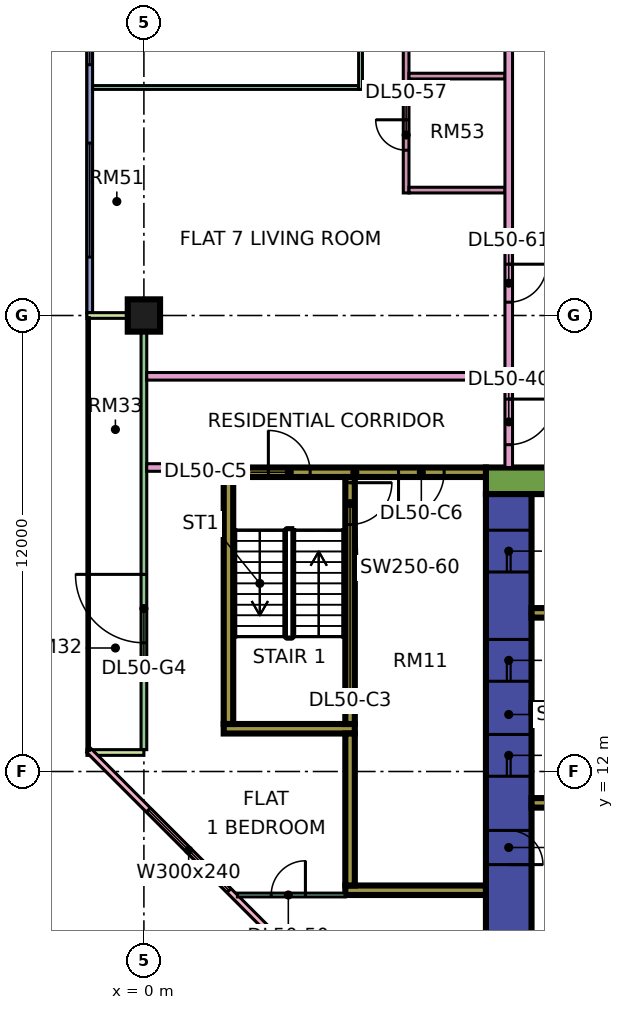
"""IFC4 building model, lengths in metres.
Left out: names, types, materials, properties, quantities, classifications, styles, units other than length and angle.
Written with IfcOpenShell. Run it as: python <this file> out.ifc"""

import sys

from ifc_helpers import new_model, si_unit, direction, frame, frame_2d, origin, origin_2d, place, context, subcontext, project, spatial, rectangle, extrude, element, fill, save


model = new_model("IFC4")
c1 = context("Model", 3, precision=1e-05, world=origin(), true_north=direction((0.0, 1.0)))
c2 = subcontext(c1, "Body", "Model", "MODEL_VIEW")
j1 = project(units=[si_unit("LENGTHUNIT", "METRE"), si_unit("PLANEANGLEUNIT", "RADIAN")], contexts=[c1])
p1 = place(None, origin())
s1 = spatial("IfcSite", under=j1, at=p1, CompositionType="ELEMENT")
p2 = place(p1, origin())
s2 = spatial("IfcBuilding", under=s1, at=p2, CompositionType="ELEMENT")
p3 = place(p2, frame((0.0, 0.0, 215.4)))
s3 = spatial("IfcBuildingStorey", under=s2, at=p3, CompositionType="ELEMENT", Elevation=215.4)
p4 = place(p3, frame((0.0, 24.0, 0.0), z_axis=(0.0, 0.0, 1.0), x_axis=(1.0, 0.0, 0.0)))
e1 = element("IfcColumn", 1, at=p4, inside=s3, PredefinedType="COLUMN", context=c2, shape_type="SweptSolid", body=[
    extrude(rectangle(XDim=0.85, YDim=0.85, at=origin_2d()), origin(), (0.0, 0.0, 1.0), 3.75),
])
p5 = place(p3, frame((9.0, 19.65, 0.0), z_axis=(0.0, 0.0, 1.0), x_axis=(1.0, 0.0, 0.0)))
e2 = element("IfcWall", 2, at=p5, inside=s3, PredefinedType="SHEAR", context=c2, shape_type="SweptSolid", body=[
    extrude(rectangle(XDim=25.0, YDim=0.7, at=frame_2d((12.5, 0.0))), origin(), (0.0, 0.0, 1.0), 3.75),
])
p6 = place(p5, frame((19.1, 0.0, 0.0)))
e3 = element("IfcOpeningElement", 3, at=p6, cuts=e2, PredefinedType="OPENING", context=c2, shape_type="SweptSolid", body=[
    extrude(rectangle(XDim=1.8, YDim=2.4, at=frame_2d((0.9, 1.2))), frame((0.0, 0.36, 0.0), z_axis=(0.0, -1.0, 0.0), x_axis=(1.0, 0.0, 0.0)), (0.0, 0.0, 1.0), 0.72),
])
p7 = place(p3, frame((9.6, 7.7, 0.0), z_axis=(0.0, 0.0, 1.0), x_axis=(0.0, 1.0, 0.0)))
e4 = element("IfcWall", 4, at=p7, inside=s3, PredefinedType="SHEAR", context=c2, shape_type="SweptSolid", body=[
    extrude(rectangle(XDim=11.6, YDim=1.2, at=frame_2d((5.8, 0.0))), origin(), (0.0, 0.0, 1.0), 3.75),
])
p8 = place(p7, frame((4.175, 0.0, 0.0)))
e5 = element("IfcOpeningElement", 5, at=p8, cuts=e4, PredefinedType="OPENING", context=c2, shape_type="SweptSolid", body=[
    extrude(rectangle(XDim=1.1, YDim=2.2, at=frame_2d((0.55, 1.1))), frame((0.0, 0.61, 0.0), z_axis=(0.0, -1.0, 0.0), x_axis=(1.0, 0.0, 0.0)), (0.0, 0.0, 1.0), 1.22),
])
p9 = place(p7, frame((6.675, 0.0, 0.0)))
e6 = element("IfcOpeningElement", 6, at=p9, cuts=e4, PredefinedType="OPENING", context=c2, shape_type="SweptSolid", body=[
    extrude(rectangle(XDim=1.1, YDim=2.2, at=frame_2d((0.55, 1.1))), frame((0.0, 0.61, 0.0), z_axis=(0.0, -1.0, 0.0), x_axis=(1.0, 0.0, 0.0)), (0.0, 0.0, 1.0), 1.22),
])
p10 = place(p7, frame((9.55, 0.0, 0.0)))
e7 = element("IfcOpeningElement", 7, at=p10, cuts=e4, PredefinedType="OPENING", context=c2, shape_type="SweptSolid", body=[
    extrude(rectangle(XDim=1.1, YDim=2.2, at=frame_2d((0.55, 1.1))), frame((0.0, 0.61, 0.0), z_axis=(0.0, -1.0, 0.0), x_axis=(1.0, 0.0, 0.0)), (0.0, 0.0, 1.0), 1.22),
])
p11 = place(p7, frame((1.85, 0.0, 0.0)))
e8 = element("IfcOpeningElement", 8, at=p11, cuts=e4, PredefinedType="OPENING", context=c2, shape_type="SweptSolid", body=[
    extrude(rectangle(XDim=0.9, YDim=2.1, at=frame_2d((0.45, 1.05))), frame((0.0, 0.61, 0.0), z_axis=(0.0, -1.0, 0.0), x_axis=(1.0, 0.0, 0.0)), (0.0, 0.0, 1.0), 1.22),
])
for number, where, z_axis, x_axis in (
    (9, (10.2, 11.175, 0.0), (0.0, 0.0, 1.0), (1.0, 0.0, 0.0)),
    (10, (10.2, 13.675, 0.0), (0.0, 0.0, 1.0), (1.0, 0.0, 0.0)),
    (11, (10.2, 16.175, 0.0), (0.0, 0.0, 1.0), (1.0, 0.0, 0.0)),
):
    element("IfcWall", number, at=place(p3, frame(where, z_axis=z_axis, x_axis=x_axis)), inside=s3, PredefinedType="SHEAR", context=c2, shape_type="SweptSolid", body=[
        extrude(rectangle(XDim=3.0, YDim=0.25, at=frame_2d((1.5, 0.0))), origin(), (0.0, 0.0, 1.0), 3.75),
    ])
p12 = place(p3, frame((2.1, 19.875, 0.0), z_axis=(0.0, 0.0, 1.0), x_axis=(1.0, 0.0, 0.0)))
e12 = element("IfcWall", 12, at=p12, inside=s3, PredefinedType="SHEAR", context=c2, shape_type="SweptSolid", body=[
    extrude(rectangle(XDim=6.9, YDim=0.25, at=frame_2d((3.45, 0.0))), origin(), (0.0, 0.0, 1.0), 3.75),
])
p13 = place(p12, frame((1.175, 0.0, 0.0)))
e13 = element("IfcOpeningElement", 13, at=p13, cuts=e12, PredefinedType="OPENING", context=c2, shape_type="SweptSolid", body=[
    extrude(rectangle(XDim=1.1, YDim=2.2, at=frame_2d((0.55, 1.1))), frame((0.0, 0.135, 0.0), z_axis=(0.0, -1.0, 0.0), x_axis=(1.0, 0.0, 0.0)), (0.0, 0.0, 1.0), 0.27),
])
p14 = place(p12, frame((4.6, 0.0, 0.0)))
e14 = element("IfcOpeningElement", 14, at=p14, cuts=e12, PredefinedType="OPENING", context=c2, shape_type="SweptSolid", body=[
    extrude(rectangle(XDim=1.2, YDim=2.2, at=frame_2d((0.6, 1.1))), frame((0.0, 0.135, 0.0), z_axis=(0.0, -1.0, 0.0), x_axis=(1.0, 0.0, 0.0)), (0.0, 0.0, 1.0), 0.27),
])
p15 = place(p3, frame((2.1, 13.125, 0.0), z_axis=(0.0, 0.0, 1.0), x_axis=(1.0, 0.0, 0.0)))
e15 = element("IfcWall", 15, at=p15, inside=s3, PredefinedType="SHEAR", context=c2, shape_type="SweptSolid", body=[
    extrude(rectangle(XDim=3.45, YDim=0.25, at=frame_2d((1.725, 0.0))), origin(), (0.0, 0.0, 1.0), 3.75),
])
p16 = place(p3, frame((2.225, 13.25, 0.0), z_axis=(0.0, 0.0, 1.0), x_axis=(0.0, 1.0, 0.0)))
e16 = element("IfcWall", 16, at=p16, inside=s3, PredefinedType="SHEAR", context=c2, shape_type="SweptSolid", body=[
    extrude(rectangle(XDim=6.5, YDim=0.25, at=frame_2d((3.25, 0.0))), origin(), (0.0, 0.0, 1.0), 3.75),
])
p17 = place(p3, frame((5.425, 13.25, 0.0), z_axis=(0.0, 0.0, 1.0), x_axis=(0.0, 1.0, 0.0)))
e17 = element("IfcWall", 17, at=p17, inside=s3, PredefinedType="SHEAR", context=c2, shape_type="SweptSolid", body=[
    extrude(rectangle(XDim=6.5, YDim=0.25, at=frame_2d((3.25, 0.0))), origin(), (0.0, 0.0, 1.0), 3.75),
])
p18 = place(p17, frame((5.25, 0.0, 0.0)))
e18 = element("IfcOpeningElement", 18, at=p18, cuts=e17, PredefinedType="OPENING", context=c2, shape_type="SweptSolid", body=[
    extrude(rectangle(XDim=1.1, YDim=2.2, at=frame_2d((0.55, 1.1))), frame((0.0, 0.135, 0.0), z_axis=(0.0, -1.0, 0.0), x_axis=(1.0, 0.0, 0.0)), (0.0, 0.0, 1.0), 0.27),
])
p19 = place(p3, frame((5.3, 8.875, 0.0), z_axis=(0.0, 0.0, 1.0), x_axis=(1.0, 0.0, 0.0)))
e19 = element("IfcWall", 19, at=p19, inside=s3, PredefinedType="SHEAR", context=c2, shape_type="SweptSolid", body=[
    extrude(rectangle(XDim=3.7, YDim=0.25, at=frame_2d((1.85, 0.0))), origin(), (0.0, 0.0, 1.0), 3.75),
])
p20 = place(p3, frame((5.425, 9.0, 0.0), z_axis=(0.0, 0.0, 1.0), x_axis=(0.0, 1.0, 0.0)))
e20 = element("IfcWall", 20, at=p20, inside=s3, PredefinedType="SHEAR", context=c2, shape_type="SweptSolid", body=[
    extrude(rectangle(XDim=4.0, YDim=0.25, at=frame_2d((2.0, 0.0))), origin(), (0.0, 0.0, 1.0), 3.75),
])
p21 = place(p3, frame((-1.425, 35.925, 0.0), z_axis=(0.0, 0.0, 1.0), x_axis=(0.0, -1.0, 0.0)))
e21 = element("IfcWall", 21, at=p21, inside=s3, PredefinedType="SOLIDWALL", context=c2, shape_type="SweptSolid", body=[
    extrude(rectangle(XDim=11.85, YDim=0.15, at=frame_2d((5.925, 0.0))), origin(), (0.0, 0.0, 1.0), 3.35),
])
p22 = place(p21, frame((0.562, 0.0, 0.45)))
e22 = element("IfcOpeningElement", 22, at=p22, cuts=e21, PredefinedType="OPENING", context=c2, shape_type="SweptSolid", body=[
    extrude(rectangle(XDim=1.8, YDim=2.4, at=frame_2d((0.9, 1.2))), frame((0.0, 0.085, 0.0), z_axis=(0.0, -1.0, 0.0), x_axis=(1.0, 0.0, 0.0)), (0.0, 0.0, 1.0), 0.17),
])
p23 = place(p21, frame((3.525, 0.0, 0.45)))
e23 = element("IfcOpeningElement", 23, at=p23, cuts=e21, PredefinedType="OPENING", context=c2, shape_type="SweptSolid", body=[
    extrude(rectangle(XDim=1.8, YDim=2.4, at=frame_2d((0.9, 1.2))), frame((0.0, 0.085, 0.0), z_axis=(0.0, -1.0, 0.0), x_axis=(1.0, 0.0, 0.0)), (0.0, 0.0, 1.0), 0.17),
])
p24 = place(p21, frame((7.387, 0.0, 0.45)))
e24 = element("IfcOpeningElement", 24, at=p24, cuts=e21, PredefinedType="OPENING", context=c2, shape_type="SweptSolid", body=[
    extrude(rectangle(XDim=3.0, YDim=2.4, at=frame_2d((1.5, 1.2))), frame((0.0, 0.085, 0.0), z_axis=(0.0, -1.0, 0.0), x_axis=(1.0, 0.0, 0.0)), (0.0, 0.0, 1.0), 0.17),
])
p25 = place(p3, frame((0.0, 23.925, 0.0), z_axis=(0.0, 0.0, 1.0), x_axis=(0.0, -1.0, 0.0)))
e25 = element("IfcWall", 25, at=p25, inside=s3, PredefinedType="SOLIDWALL", context=c2, shape_type="SweptSolid", body=[
    extrude(rectangle(XDim=11.35, YDim=0.15, at=frame_2d((5.675, 0.0))), origin(), (0.0, 0.0, 1.0), 3.35),
])
p26 = place(p25, frame((6.738, 0.0, 0.0)))
e26 = element("IfcOpeningElement", 26, at=p26, cuts=e25, PredefinedType="OPENING", context=c2, shape_type="SweptSolid", body=[
    extrude(rectangle(XDim=1.8, YDim=2.4, at=frame_2d((0.9, 1.2))), frame((0.0, 0.085, 0.0), z_axis=(0.0, -1.0, 0.0), x_axis=(1.0, 0.0, 0.0)), (0.0, 0.0, 1.0), 0.17),
])
for number, where, z_axis, x_axis in (
    (27, (-1.5, 24.0, 0.0), (0.0, 0.0, 1.0), (1.0, 0.0, 0.0)),
    (28, (-1.5, 12.5, 0.0), (0.0, 0.0, 1.0), (1.0, 0.0, 0.0)),
):
    element("IfcWall", number, at=place(p3, frame(where, z_axis=z_axis, x_axis=x_axis)), inside=s3, PredefinedType="SOLIDWALL", context=c2, shape_type="SweptSolid", body=[
        extrude(rectangle(XDim=1.5, YDim=0.15, at=frame_2d((0.75, 0.0))), origin(), (0.0, 0.0, 1.0), 3.35),
    ])
p27 = place(p3, frame((-1.447, 12.553, 0.0), z_axis=(0.0, 0.0, 1.0), x_axis=(0.707106781187, -0.707106781187, 0.0)))
e29 = element("IfcWall", 29, at=p27, inside=s3, PredefinedType="SOLIDWALL", context=c2, shape_type="SweptSolid", body=[
    extrude(rectangle(XDim=19.799, YDim=0.15, at=frame_2d((9.899, 0.0))), origin(), (0.0, 0.0, 1.0), 3.35),
])
p28 = place(p27, frame((2.212, 0.0, 0.45)))
e30 = element("IfcOpeningElement", 30, at=p28, cuts=e29, PredefinedType="OPENING", context=c2, shape_type="SweptSolid", body=[
    extrude(rectangle(XDim=3.0, YDim=2.4, at=frame_2d((1.5, 1.2))), frame((0.0, 0.085, 0.0), z_axis=(0.0, -1.0, 0.0), x_axis=(1.0, 0.0, 0.0)), (0.0, 0.0, 1.0), 0.17),
])
p29 = place(p27, frame((10.216, 0.0, 0.45)))
e31 = element("IfcOpeningElement", 31, at=p29, cuts=e29, PredefinedType="OPENING", context=c2, shape_type="SweptSolid", body=[
    extrude(rectangle(XDim=3.0, YDim=2.4, at=frame_2d((1.5, 1.2))), frame((0.0, 0.085, 0.0), z_axis=(0.0, -1.0, 0.0), x_axis=(1.0, 0.0, 0.0)), (0.0, 0.0, 1.0), 0.17),
])
p30 = place(p3, frame((-1.35, 30.0, 0.0), z_axis=(0.0, 0.0, 1.0), x_axis=(1.0, 0.0, 0.0)))
e32 = element("IfcWall", 32, at=p30, inside=s3, PredefinedType="PARTITIONING", context=c2, shape_type="SweptSolid", body=[
    extrude(rectangle(XDim=7.0, YDim=0.1, at=frame_2d((3.5, 0.0))), origin(), (0.0, 0.0, 1.0), 3.35),
])
p31 = place(p3, frame((0.074, 20.0, 0.0), z_axis=(0.0, 0.0, 1.0), x_axis=(1.0, 0.0, 0.0)))
e33 = element("IfcWall", 33, at=p31, inside=s3, PredefinedType="PARTITIONING", context=c2, shape_type="SweptSolid", body=[
    extrude(rectangle(XDim=2.026, YDim=0.2, at=frame_2d((1.013, 0.0))), origin(), (0.0, 0.0, 1.0), 3.35),
])
p32 = place(p3, frame((0.074, 22.4, 0.0), z_axis=(0.0, 0.0, 1.0), x_axis=(1.0, 0.0, 0.0)))
e34 = element("IfcWall", 34, at=p32, inside=s3, PredefinedType="PARTITIONING", context=c2, shape_type="SweptSolid", body=[
    extrude(rectangle(XDim=9.426, YDim=0.2, at=frame_2d((4.713, 0.0))), origin(), (0.0, 0.0, 1.0), 3.35),
])
p33 = place(p3, frame((2.461, 8.75, 0.0), z_axis=(0.0, 0.0, 1.0), x_axis=(1.0, 0.0, 0.0)))
e35 = element("IfcWall", 35, at=p33, inside=s3, PredefinedType="PARTITIONING", context=c2, shape_type="SweptSolid", body=[
    extrude(rectangle(XDim=2.839, YDim=0.1, at=frame_2d((1.419, 0.0))), origin(), (0.0, 0.0, 1.0), 3.35),
])
p34 = place(p33, frame((0.889, 0.0, 0.0)))
e36 = element("IfcOpeningElement", 36, at=p34, cuts=e35, PredefinedType="OPENING", context=c2, shape_type="SweptSolid", body=[
    extrude(rectangle(XDim=0.9, YDim=2.1, at=frame_2d((0.45, 1.05))), frame((0.0, 0.06, 0.0), z_axis=(0.0, -1.0, 0.0), x_axis=(1.0, 0.0, 0.0)), (0.0, 0.0, 1.0), 0.12),
])
p35 = place(p3, frame((5.7, 29.95, 0.0), z_axis=(0.0, 0.0, 1.0), x_axis=(0.0, 1.0, 0.0)))
e37 = element("IfcWall", 37, at=p35, inside=s3, PredefinedType="PARTITIONING", context=c2, shape_type="SweptSolid", body=[
    extrude(rectangle(XDim=5.95, YDim=0.1, at=frame_2d((2.975, 0.0))), origin(), (0.0, 0.0, 1.0), 3.35),
])
p36 = place(p35, frame((1.1, 0.0, 0.0)))
e38 = element("IfcOpeningElement", 38, at=p36, cuts=e37, PredefinedType="OPENING", context=c2, shape_type="SweptSolid", body=[
    extrude(rectangle(XDim=0.9, YDim=2.1, at=frame_2d((0.45, 1.05))), frame((0.0, 0.06, 0.0), z_axis=(0.0, -1.0, 0.0), x_axis=(1.0, 0.0, 0.0)), (0.0, 0.0, 1.0), 0.12),
])
p37 = place(p35, frame((4.1, 0.0, 0.0)))
e39 = element("IfcOpeningElement", 39, at=p37, cuts=e37, PredefinedType="OPENING", context=c2, shape_type="SweptSolid", body=[
    extrude(rectangle(XDim=0.9, YDim=2.1, at=frame_2d((0.45, 1.05))), frame((0.0, 0.06, 0.0), z_axis=(0.0, -1.0, 0.0), x_axis=(1.0, 0.0, 0.0)), (0.0, 0.0, 1.0), 0.12),
])
p38 = place(p3, frame((6.9, 27.225, 0.0), z_axis=(0.0, 0.0, 1.0), x_axis=(0.0, 1.0, 0.0)))
e40 = element("IfcWall", 40, at=p38, inside=s3, PredefinedType="PARTITIONING", context=c2, shape_type="SweptSolid", body=[
    extrude(rectangle(XDim=8.675, YDim=0.15, at=frame_2d((4.337, 0.0))), origin(), (0.0, 0.0, 1.0), 3.35),
])
p39 = place(p38, frame((1.125, 0.0, 0.0)))
e41 = element("IfcOpeningElement", 41, at=p39, cuts=e40, PredefinedType="OPENING", context=c2, shape_type="SweptSolid", body=[
    extrude(rectangle(XDim=0.8, YDim=2.1, at=frame_2d((0.4, 1.05))), frame((0.0, 0.085, 0.0), z_axis=(0.0, -1.0, 0.0), x_axis=(1.0, 0.0, 0.0)), (0.0, 0.0, 1.0), 0.17),
])
p40 = place(p38, frame((5.475, 0.0, 0.0)))
e42 = element("IfcOpeningElement", 42, at=p40, cuts=e40, PredefinedType="OPENING", context=c2, shape_type="SweptSolid", body=[
    extrude(rectangle(XDim=0.9, YDim=2.1, at=frame_2d((0.45, 1.05))), frame((0.0, 0.085, 0.0), z_axis=(0.0, -1.0, 0.0), x_axis=(1.0, 0.0, 0.0)), (0.0, 0.0, 1.0), 0.17),
])
for number, where, z_axis, x_axis in (
    (43, (6.975, 27.3, 0.0), (0.0, 0.0, 1.0), (1.0, 0.0, 0.0)),
    (44, (6.975, 30.3, 0.0), (0.0, 0.0, 1.0), (1.0, 0.0, 0.0)),
):
    element("IfcWall", number, at=place(p3, frame(where, z_axis=z_axis, x_axis=x_axis)), inside=s3, PredefinedType="PARTITIONING", context=c2, shape_type="SweptSolid", body=[
        extrude(rectangle(XDim=2.525, YDim=0.15, at=frame_2d((1.262, 0.0))), origin(), (0.0, 0.0, 1.0), 3.35),
    ])
p41 = place(p3, frame((9.6, 20.0, 0.0), z_axis=(0.0, 0.0, 1.0), x_axis=(0.0, 1.0, 0.0)))
e45 = element("IfcWall", 45, at=p41, inside=s3, PredefinedType="PARTITIONING", context=c2, shape_type="SweptSolid", body=[
    extrude(rectangle(XDim=44.35, YDim=0.2, at=frame_2d((22.175, 0.0))), origin(), (0.0, 0.0, 1.0), 3.35),
])
p42 = place(p41, frame((17.25, 0.0, 0.0)))
e46 = element("IfcOpeningElement", 46, at=p42, cuts=e45, PredefinedType="OPENING", context=c2, shape_type="SweptSolid", body=[
    extrude(rectangle(XDim=1.0, YDim=2.1, at=frame_2d((0.5, 1.05))), frame((0.0, 0.11, 0.0), z_axis=(0.0, -1.0, 0.0), x_axis=(1.0, 0.0, 0.0)), (0.0, 0.0, 1.0), 0.22),
])
p43 = place(p41, frame((0.6, 0.0, 0.0)))
e47 = element("IfcOpeningElement", 47, at=p43, cuts=e45, PredefinedType="OPENING", context=c2, shape_type="SweptSolid", body=[
    extrude(rectangle(XDim=1.2, YDim=2.1, at=frame_2d((0.6, 1.05))), frame((0.0, 0.11, 0.0), z_axis=(0.0, -1.0, 0.0), x_axis=(1.0, 0.0, 0.0)), (0.0, 0.0, 1.0), 0.22),
])
p44 = place(p41, frame((4.35, 0.0, 0.0)))
e48 = element("IfcOpeningElement", 48, at=p44, cuts=e45, PredefinedType="OPENING", context=c2, shape_type="SweptSolid", body=[
    extrude(rectangle(XDim=1.0, YDim=2.1, at=frame_2d((0.5, 1.05))), frame((0.0, 0.11, 0.0), z_axis=(0.0, -1.0, 0.0), x_axis=(1.0, 0.0, 0.0)), (0.0, 0.0, 1.0), 0.22),
])
p45 = place(p23, origin())
e49 = element("IfcWindow", 49, at=p45, inside=s3, PartitioningType="SINGLE_PANEL", PredefinedType="WINDOW", context=c2, shape_type="SweptSolid", body=[
    extrude(rectangle(XDim=1.8, YDim=2.4, at=frame_2d((0.9, 1.2))), frame((0.0, 0.03, 0.0), z_axis=(0.0, -1.0, 0.0), x_axis=(1.0, 0.0, 0.0)), (0.0, 0.0, 1.0), 0.06),
])
fill(e23, e49)
p46 = place(p24, origin())
e50 = element("IfcWindow", 50, at=p46, inside=s3, PartitioningType="SINGLE_PANEL", PredefinedType="WINDOW", context=c2, shape_type="SweptSolid", body=[
    extrude(rectangle(XDim=3.0, YDim=2.4, at=frame_2d((1.5, 1.2))), frame((0.0, 0.03, 0.0), z_axis=(0.0, -1.0, 0.0), x_axis=(1.0, 0.0, 0.0)), (0.0, 0.0, 1.0), 0.06),
])
fill(e24, e50)
p47 = place(p26, frame((1.8, 0.0, 0.0), z_axis=(0.0, 0.0, 1.0), x_axis=(-1.0, 0.0, 0.0)))
e51 = element("IfcDoor", 51, at=p47, inside=s3, OperationType="DOUBLE_DOOR_SINGLE_SWING", PredefinedType="DOOR", context=c2, shape_type="SweptSolid", body=[
    extrude(rectangle(XDim=1.8, YDim=2.4, at=frame_2d((0.9, 1.2))), frame((0.0, 0.025, 0.0), z_axis=(0.0, -1.0, 0.0), x_axis=(1.0, 0.0, 0.0)), (0.0, 0.0, 1.0), 0.05),
])
fill(e26, e51)
p48 = place(p28, origin())
e52 = element("IfcWindow", 52, at=p48, inside=s3, PartitioningType="SINGLE_PANEL", PredefinedType="WINDOW", context=c2, shape_type="SweptSolid", body=[
    extrude(rectangle(XDim=3.0, YDim=2.4, at=frame_2d((1.5, 1.2))), frame((0.0, 0.03, 0.0), z_axis=(0.0, -1.0, 0.0), x_axis=(1.0, 0.0, 0.0)), (0.0, 0.0, 1.0), 0.06),
])
fill(e30, e52)
p49 = place(p8, origin())
e53 = element("IfcDoor", 53, at=p49, inside=s3, OperationType="DOUBLE_DOOR_SLIDING", PredefinedType="DOOR", context=c2, shape_type="SweptSolid", body=[
    extrude(rectangle(XDim=1.1, YDim=2.2, at=frame_2d((0.55, 1.1))), frame((0.0, 0.025, 0.0), z_axis=(0.0, -1.0, 0.0), x_axis=(1.0, 0.0, 0.0)), (0.0, 0.0, 1.0), 0.05),
])
fill(e5, e53)
p50 = place(p9, origin())
e54 = element("IfcDoor", 54, at=p50, inside=s3, OperationType="DOUBLE_DOOR_SLIDING", PredefinedType="DOOR", context=c2, shape_type="SweptSolid", body=[
    extrude(rectangle(XDim=1.1, YDim=2.2, at=frame_2d((0.55, 1.1))), frame((0.0, 0.025, 0.0), z_axis=(0.0, -1.0, 0.0), x_axis=(1.0, 0.0, 0.0)), (0.0, 0.0, 1.0), 0.05),
])
fill(e6, e54)
p51 = place(p10, origin())
e55 = element("IfcDoor", 55, at=p51, inside=s3, OperationType="DOUBLE_DOOR_SLIDING", PredefinedType="DOOR", context=c2, shape_type="SweptSolid", body=[
    extrude(rectangle(XDim=1.1, YDim=2.2, at=frame_2d((0.55, 1.1))), frame((0.0, 0.025, 0.0), z_axis=(0.0, -1.0, 0.0), x_axis=(1.0, 0.0, 0.0)), (0.0, 0.0, 1.0), 0.05),
])
fill(e7, e55)
p52 = place(p18, origin())
e56 = element("IfcDoor", 56, at=p52, inside=s3, OperationType="SINGLE_SWING_RIGHT", PredefinedType="DOOR", context=c2, shape_type="SweptSolid", body=[
    extrude(rectangle(XDim=1.1, YDim=2.2, at=frame_2d((0.55, 1.1))), frame((0.0, 0.025, 0.0), z_axis=(0.0, -1.0, 0.0), x_axis=(1.0, 0.0, 0.0)), (0.0, 0.0, 1.0), 0.05),
])
fill(e18, e56)
p53 = place(p11, frame((0.9, 0.0, 0.0), z_axis=(0.0, 0.0, 1.0), x_axis=(-1.0, 0.0, 0.0)))
e57 = element("IfcDoor", 57, at=p53, inside=s3, OperationType="SINGLE_SWING_LEFT", PredefinedType="DOOR", context=c2, shape_type="SweptSolid", body=[
    extrude(rectangle(XDim=0.9, YDim=2.1, at=frame_2d((0.45, 1.05))), frame((0.0, 0.025, 0.0), z_axis=(0.0, -1.0, 0.0), x_axis=(1.0, 0.0, 0.0)), (0.0, 0.0, 1.0), 0.05),
])
fill(e8, e57)
p54 = place(p13, origin())
e58 = element("IfcDoor", 58, at=p54, inside=s3, OperationType="SINGLE_SWING_LEFT", PredefinedType="DOOR", context=c2, shape_type="SweptSolid", body=[
    extrude(rectangle(XDim=1.1, YDim=2.2, at=frame_2d((0.55, 1.1))), frame((0.0, 0.025, 0.0), z_axis=(0.0, -1.0, 0.0), x_axis=(1.0, 0.0, 0.0)), (0.0, 0.0, 1.0), 0.05),
])
fill(e13, e58)
p55 = place(p14, frame((1.2, 0.0, 0.0), z_axis=(0.0, 0.0, 1.0), x_axis=(-1.0, 0.0, 0.0)))
e59 = element("IfcDoor", 59, at=p55, inside=s3, OperationType="SINGLE_SWING_LEFT", PredefinedType="DOOR", context=c2, shape_type="SweptSolid", body=[
    extrude(rectangle(XDim=1.2, YDim=2.2, at=frame_2d((0.6, 1.1))), frame((0.0, 0.025, 0.0), z_axis=(0.0, -1.0, 0.0), x_axis=(1.0, 0.0, 0.0)), (0.0, 0.0, 1.0), 0.05),
])
fill(e14, e59)
p56 = place(p43, origin())
e60 = element("IfcDoor", 60, at=p56, inside=s3, OperationType="SINGLE_SWING_RIGHT", PredefinedType="DOOR", context=c2, shape_type="SweptSolid", body=[
    extrude(rectangle(XDim=1.2, YDim=2.1, at=frame_2d((0.6, 1.05))), frame((0.0, 0.025, 0.0), z_axis=(0.0, -1.0, 0.0), x_axis=(1.0, 0.0, 0.0)), (0.0, 0.0, 1.0), 0.05),
])
fill(e47, e60)
p57 = place(p34, frame((0.9, 0.0, 0.0), z_axis=(0.0, 0.0, 1.0), x_axis=(-1.0, 0.0, 0.0)))
e61 = element("IfcDoor", 61, at=p57, inside=s3, OperationType="SINGLE_SWING_RIGHT", PredefinedType="DOOR", context=c2, shape_type="SweptSolid", body=[
    extrude(rectangle(XDim=0.9, YDim=2.1, at=frame_2d((0.45, 1.05))), frame((0.0, 0.025, 0.0), z_axis=(0.0, -1.0, 0.0), x_axis=(1.0, 0.0, 0.0)), (0.0, 0.0, 1.0), 0.05),
])
fill(e36, e61)
p58 = place(p39, frame((0.8, 0.0, 0.0), z_axis=(0.0, 0.0, 1.0), x_axis=(-1.0, 0.0, 0.0)))
e62 = element("IfcDoor", 62, at=p58, inside=s3, OperationType="SINGLE_SWING_RIGHT", PredefinedType="DOOR", context=c2, shape_type="SweptSolid", body=[
    extrude(rectangle(XDim=0.8, YDim=2.1, at=frame_2d((0.4, 1.05))), frame((0.0, 0.025, 0.0), z_axis=(0.0, -1.0, 0.0), x_axis=(1.0, 0.0, 0.0)), (0.0, 0.0, 1.0), 0.05),
])
fill(e41, e62)
p59 = place(p44, origin())
e63 = element("IfcDoor", 63, at=p59, inside=s3, OperationType="SINGLE_SWING_RIGHT", PredefinedType="DOOR", context=c2, shape_type="SweptSolid", body=[
    extrude(rectangle(XDim=1.0, YDim=2.1, at=frame_2d((0.5, 1.05))), frame((0.0, 0.025, 0.0), z_axis=(0.0, -1.0, 0.0), x_axis=(1.0, 0.0, 0.0)), (0.0, 0.0, 1.0), 0.05),
])
fill(e48, e63)
save(model, sys.argv[1])
